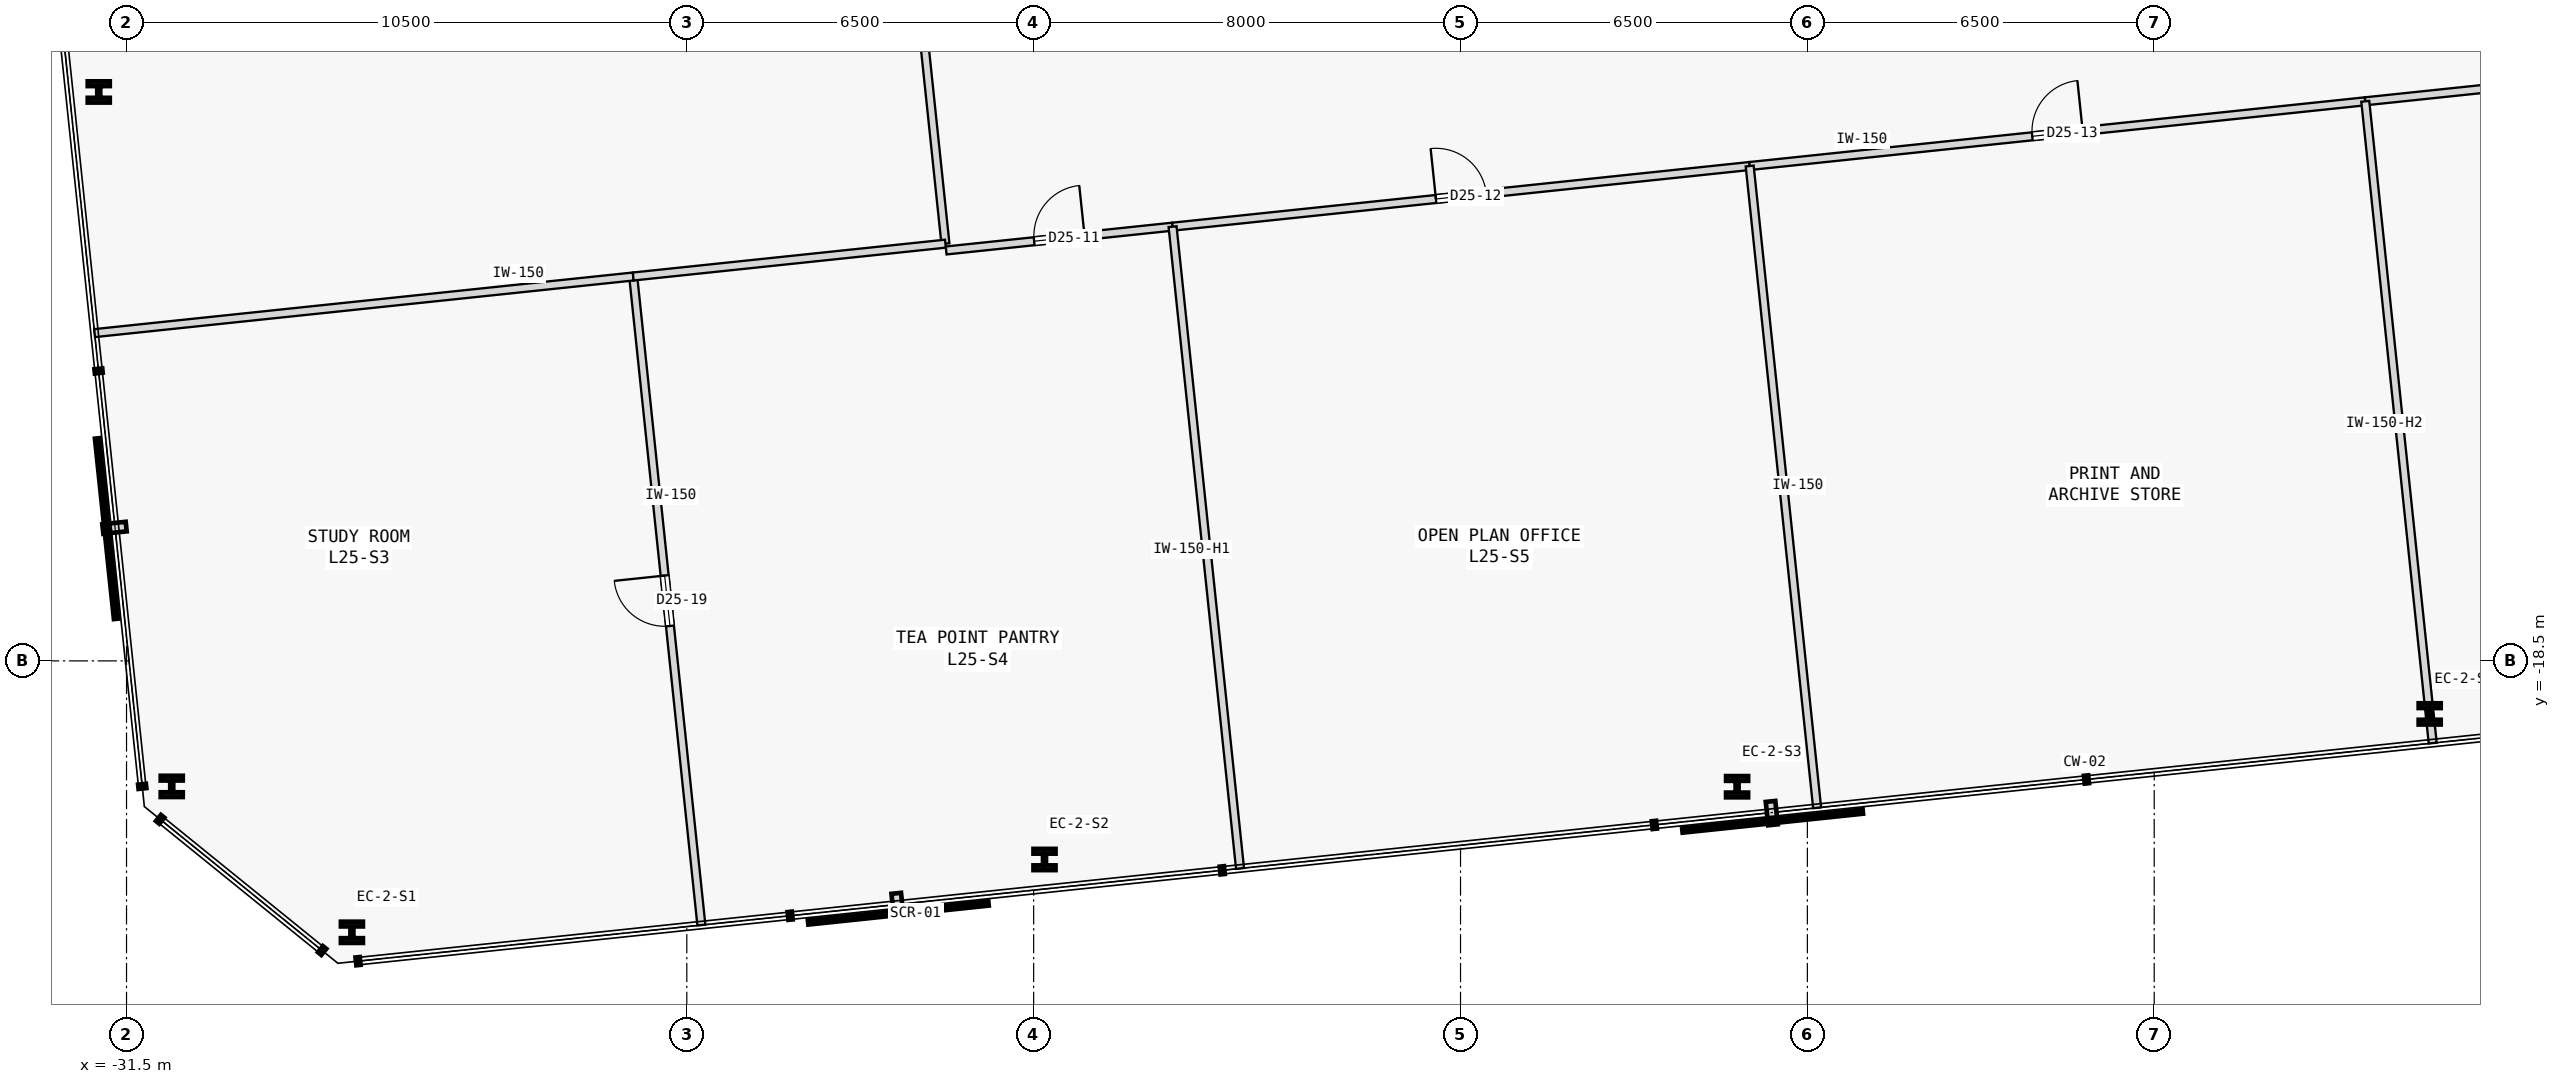
"""IFC4 building model, lengths in metres.
Left out: names, types, materials, properties, quantities, classifications, styles, units other than length and angle.
Written with IfcOpenShell. Run it as: python <this file> out.ifc"""

import sys

from ifc_helpers import new_model, si_unit, direction, frame, frame_2d, origin, origin_2d, place, context, subcontext, project, spatial, rectangle, i_section, extrude, element, fill, save


model = new_model("IFC4")
c1 = context("Model", 3, precision=1e-05, world=origin(), true_north=direction((0.0, 1.0)))
c2 = subcontext(c1, "Body", "Model", "MODEL_VIEW")
j1 = project(units=[si_unit("LENGTHUNIT", "METRE"), si_unit("PLANEANGLEUNIT", "RADIAN")], contexts=[c1])
p1 = place(None, origin())
s1 = spatial("IfcSite", under=j1, at=p1, CompositionType="ELEMENT")
p2 = place(p1, origin())
s2 = spatial("IfcBuilding", under=s1, at=p2, CompositionType="ELEMENT")
p3 = place(p2, frame((0.0, 0.0, 102.2)))
s3 = spatial("IfcBuildingStorey", under=s2, at=p3, CompositionType="ELEMENT", Elevation=102.2)
for number, where, z_axis, x_axis in (
    (1, (-27.276, -23.586, 0.0), (0.0, 0.0, 1.0), (1.0, 0.0, 0.0)),
    (2, (-14.297, -22.222, 0.0), (0.0, 0.0, 1.0), (1.0, 0.0, 0.0)),
    (3, (-1.317, -20.858, 0.0), (0.0, 0.0, 1.0), (1.0, 0.0, 0.0)),
    (4, (11.663, -19.494, 0.0), (0.0, 0.0, 1.0), (1.0, 0.0, 0.0)),
    (5, (-32.021, -7.838, 0.0), (0.0, 0.0, 1.0), (1.0, 0.0, 0.0)),
    (6, (-30.653, -20.852, 0.0), (0.0, 0.0, 1.0), (1.0, 0.0, 0.0)),
):
    element("IfcColumn", number, at=place(p3, frame(where, z_axis=z_axis, x_axis=x_axis)), inside=s3, PredefinedType="COLUMN", context=c2, shape_type="SweptSolid", body=[
        extrude(i_section(OverallWidth=0.413, OverallDepth=0.398, WebThickness=0.056, FlangeThickness=0.089, FilletRadius=0.015, at=origin_2d()), origin(), (0.0, 0.0, 1.0), 3.7),
    ])
p4 = place(p3, frame((-16.14, -10.809, 0.0), z_axis=(0.0, 0.0, 1.0), x_axis=(0.994520805081, 0.104538836136, 0.0)))
e7 = element("IfcWall", 7, at=p4, inside=s3, PredefinedType="PARTITIONING", context=c2, shape_type="SweptSolid", body=[
    extrude(rectangle(XDim=4.267, YDim=0.15, at=frame_2d((2.133, 0.0))), origin(), (0.0, 0.0, 1.0), 3.475),
])
p5 = place(p4, frame((1.658, 0.0, 0.0)))
e8 = element("IfcOpeningElement", 8, at=p5, cuts=e7, PredefinedType="OPENING", context=c2, shape_type="SweptSolid", body=[
    extrude(rectangle(XDim=0.95, YDim=2.15, at=frame_2d((0.475, 1.075))), frame((0.0, 0.085, 0.0), z_axis=(0.0, -1.0, 0.0), x_axis=(1.0, 0.0, 0.0)), (0.0, 0.0, 1.0), 0.17),
])
p6 = place(p3, frame((-11.896, -10.363, 0.0), z_axis=(0.0, 0.0, 1.0), x_axis=(0.994522169869, 0.104525851533, 0.0)))
e9 = element("IfcWall", 9, at=p6, inside=s3, PredefinedType="PARTITIONING", context=c2, shape_type="SweptSolid", body=[
    extrude(rectangle(XDim=10.875, YDim=0.15, at=frame_2d((5.438, 0.0))), origin(), (0.0, 0.0, 1.0), 3.475),
])
p7 = place(p6, frame((4.962, 0.0, 0.0)))
e10 = element("IfcOpeningElement", 10, at=p7, cuts=e9, PredefinedType="OPENING", context=c2, shape_type="SweptSolid", body=[
    extrude(rectangle(XDim=0.95, YDim=2.15, at=frame_2d((0.475, 1.075))), frame((0.0, 0.085, 0.0), z_axis=(0.0, -1.0, 0.0), x_axis=(1.0, 0.0, 0.0)), (0.0, 0.0, 1.0), 0.17),
])
p8 = place(p3, frame((-1.081, -9.226, 0.0), z_axis=(0.0, 0.0, 1.0), x_axis=(0.994523198252, 0.104516066418, 0.0)))
e11 = element("IfcWall", 11, at=p8, inside=s3, PredefinedType="PARTITIONING", context=c2, shape_type="SweptSolid", body=[
    extrude(rectangle(XDim=11.6, YDim=0.15, at=frame_2d((5.8, 0.0))), origin(), (0.0, 0.0, 1.0), 3.475),
])
p9 = place(p8, frame((5.325, 0.0, 0.0)))
e12 = element("IfcOpeningElement", 12, at=p9, cuts=e11, PredefinedType="OPENING", context=c2, shape_type="SweptSolid", body=[
    extrude(rectangle(XDim=0.95, YDim=2.15, at=frame_2d((0.475, 1.075))), frame((0.0, 0.085, 0.0), z_axis=(0.0, -1.0, 0.0), x_axis=(1.0, 0.0, 0.0)), (0.0, 0.0, 1.0), 0.17),
])
p10 = place(p3, frame((10.456, -8.014, 0.0), z_axis=(0.0, 0.0, 1.0), x_axis=(0.994522690965, 0.104520893393, 0.0)))
e13 = element("IfcWall", 13, at=p10, inside=s3, PredefinedType="PARTITIONING", context=c2, shape_type="SweptSolid", body=[
    extrude(rectangle(XDim=7.832, YDim=0.15, at=frame_2d((3.916, 0.0))), origin(), (0.0, 0.0, 1.0), 3.475),
])
p11 = place(p10, frame((3.441, 0.0, 0.0)))
e14 = element("IfcOpeningElement", 14, at=p11, cuts=e13, PredefinedType="OPENING", context=c2, shape_type="SweptSolid", body=[
    extrude(rectangle(XDim=0.95, YDim=2.15, at=frame_2d((0.475, 1.075))), frame((0.0, 0.085, 0.0), z_axis=(0.0, -1.0, 0.0), x_axis=(1.0, 0.0, 0.0)), (0.0, 0.0, 1.0), 0.17),
])
p12 = place(p3, frame((-16.153, -10.682, 0.0), z_axis=(0.0, 0.0, 1.0), x_axis=(-0.104527614588, 0.994521984568, 0.0)))
e15 = element("IfcWall", 15, at=p12, inside=s3, PredefinedType="PARTITIONING", context=c2, shape_type="SweptSolid", body=[
    extrude(rectangle(XDim=17.87, YDim=0.15, at=frame_2d((8.935, 0.0))), origin(), (0.0, 0.0, 1.0), 3.475),
])
p13 = place(p12, frame((8.46, 0.0, 0.0)))
e16 = element("IfcOpeningElement", 16, at=p13, cuts=e15, PredefinedType="OPENING", context=c2, shape_type="SweptSolid", body=[
    extrude(rectangle(XDim=0.95, YDim=2.15, at=frame_2d((0.475, 1.075))), frame((0.0, 0.085, 0.0), z_axis=(0.0, -1.0, 0.0), x_axis=(1.0, 0.0, 0.0)), (0.0, 0.0, 1.0), 0.17),
])
p14 = place(p3, frame((-20.727, -23.451, 0.0), z_axis=(0.0, 0.0, 1.0), x_axis=(-0.104522554453, 0.994522516392, 0.0)))
e17 = element("IfcWall", 17, at=p14, inside=s3, PredefinedType="PARTITIONING", context=c2, shape_type="SweptSolid", body=[
    extrude(rectangle(XDim=12.221, YDim=0.15, at=frame_2d((6.11, 0.0))), origin(), (0.0, 0.0, 1.0), 3.475),
])
p15 = place(p14, frame((5.635, 0.0, 0.0)))
e18 = element("IfcOpeningElement", 18, at=p15, cuts=e17, PredefinedType="OPENING", context=c2, shape_type="SweptSolid", body=[
    extrude(rectangle(XDim=0.95, YDim=2.15, at=frame_2d((0.475, 1.075))), frame((0.0, 0.085, 0.0), z_axis=(0.0, -1.0, 0.0), x_axis=(1.0, 0.0, 0.0)), (0.0, 0.0, 1.0), 0.17),
])
p16 = place(p3, frame((-32.099, -12.358, 0.0), z_axis=(0.0, 0.0, 1.0), x_axis=(0.994523757593, 0.104510743869, 0.0)))
e19 = element("IfcWall", 19, at=p16, inside=s3, PredefinedType="PARTITIONING", context=c2, shape_type="SweptSolid", body=[
    extrude(rectangle(XDim=10.15, YDim=0.15, at=frame_2d((5.075, 0.0))), origin(), (0.0, 0.0, 1.0), 3.475),
])
p17 = place(p3, frame((-10.632, -22.39, 0.0), z_axis=(0.0, 0.0, 1.0), x_axis=(-0.104535555083, 0.994521149963, 0.0)))
e20 = element("IfcWall", 20, at=p17, inside=s3, PredefinedType="PARTITIONING", context=c2, shape_type="SweptSolid", body=[
    extrude(rectangle(XDim=12.093, YDim=0.15, at=frame_2d((6.046, 0.0))), origin(), (0.0, 0.0, 1.0), 3.025),
])
p18 = place(p3, frame((-22.004, -11.297, 0.0), z_axis=(0.0, 0.0, 1.0), x_axis=(0.994521131746, 0.10453572839, 0.0)))
e21 = element("IfcWall", 21, at=p18, inside=s3, PredefinedType="PARTITIONING", context=c2, shape_type="SweptSolid", body=[
    extrude(rectangle(XDim=5.883, YDim=0.15, at=frame_2d((2.941, 0.0))), origin(), (0.0, 0.0, 1.0), 3.475),
])
p19 = place(p3, frame((0.183, -21.253, 0.0), z_axis=(0.0, 0.0, 1.0), x_axis=(-0.104535555083, 0.994521149963, 0.0)))
e22 = element("IfcWall", 22, at=p19, inside=s3, PredefinedType="PARTITIONING", context=c2, shape_type="SweptSolid", body=[
    extrude(rectangle(XDim=12.093, YDim=0.15, at=frame_2d((6.046, 0.0))), origin(), (0.0, 0.0, 1.0), 3.475),
])
p20 = place(p3, frame((11.719, -20.041, 0.0), z_axis=(0.0, 0.0, 1.0), x_axis=(-0.104517685722, 0.994523028075, 0.0)))
e23 = element("IfcWall", 23, at=p20, inside=s3, PredefinedType="PARTITIONING", context=c2, shape_type="SweptSolid", body=[
    extrude(rectangle(XDim=12.093, YDim=0.15, at=frame_2d((6.046, 0.0))), origin(), (0.0, 0.0, 1.0), 2.875),
])
p21 = place(p5, origin())
e24 = element("IfcDoor", 24, at=p21, inside=s3, OperationType="SINGLE_SWING_RIGHT", PredefinedType="DOOR", context=c2, shape_type="SweptSolid", body=[
    extrude(rectangle(XDim=0.95, YDim=2.15, at=frame_2d((0.475, 1.075))), frame((0.0, 0.025, 0.0), z_axis=(0.0, -1.0, 0.0), x_axis=(1.0, 0.0, 0.0)), (0.0, 0.0, 1.0), 0.05),
])
fill(e8, e24)
p22 = place(p7, origin())
e25 = element("IfcDoor", 25, at=p22, inside=s3, OperationType="SINGLE_SWING_LEFT", PredefinedType="DOOR", context=c2, shape_type="SweptSolid", body=[
    extrude(rectangle(XDim=0.95, YDim=2.15, at=frame_2d((0.475, 1.075))), frame((0.0, 0.025, 0.0), z_axis=(0.0, -1.0, 0.0), x_axis=(1.0, 0.0, 0.0)), (0.0, 0.0, 1.0), 0.05),
])
fill(e10, e25)
p23 = place(p9, origin())
e26 = element("IfcDoor", 26, at=p23, inside=s3, OperationType="SINGLE_SWING_RIGHT", PredefinedType="DOOR", context=c2, shape_type="SweptSolid", body=[
    extrude(rectangle(XDim=0.95, YDim=2.15, at=frame_2d((0.475, 1.075))), frame((0.0, 0.025, 0.0), z_axis=(0.0, -1.0, 0.0), x_axis=(1.0, 0.0, 0.0)), (0.0, 0.0, 1.0), 0.05),
])
fill(e12, e26)
p24 = place(p15, origin())
e27 = element("IfcDoor", 27, at=p24, inside=s3, OperationType="SINGLE_SWING_RIGHT", PredefinedType="DOOR", context=c2, shape_type="SweptSolid", body=[
    extrude(rectangle(XDim=0.95, YDim=2.15, at=frame_2d((0.475, 1.075))), frame((0.0, 0.025, 0.0), z_axis=(0.0, -1.0, 0.0), x_axis=(1.0, 0.0, 0.0)), (0.0, 0.0, 1.0), 0.05),
])
fill(e18, e27)
save(model, sys.argv[1])
